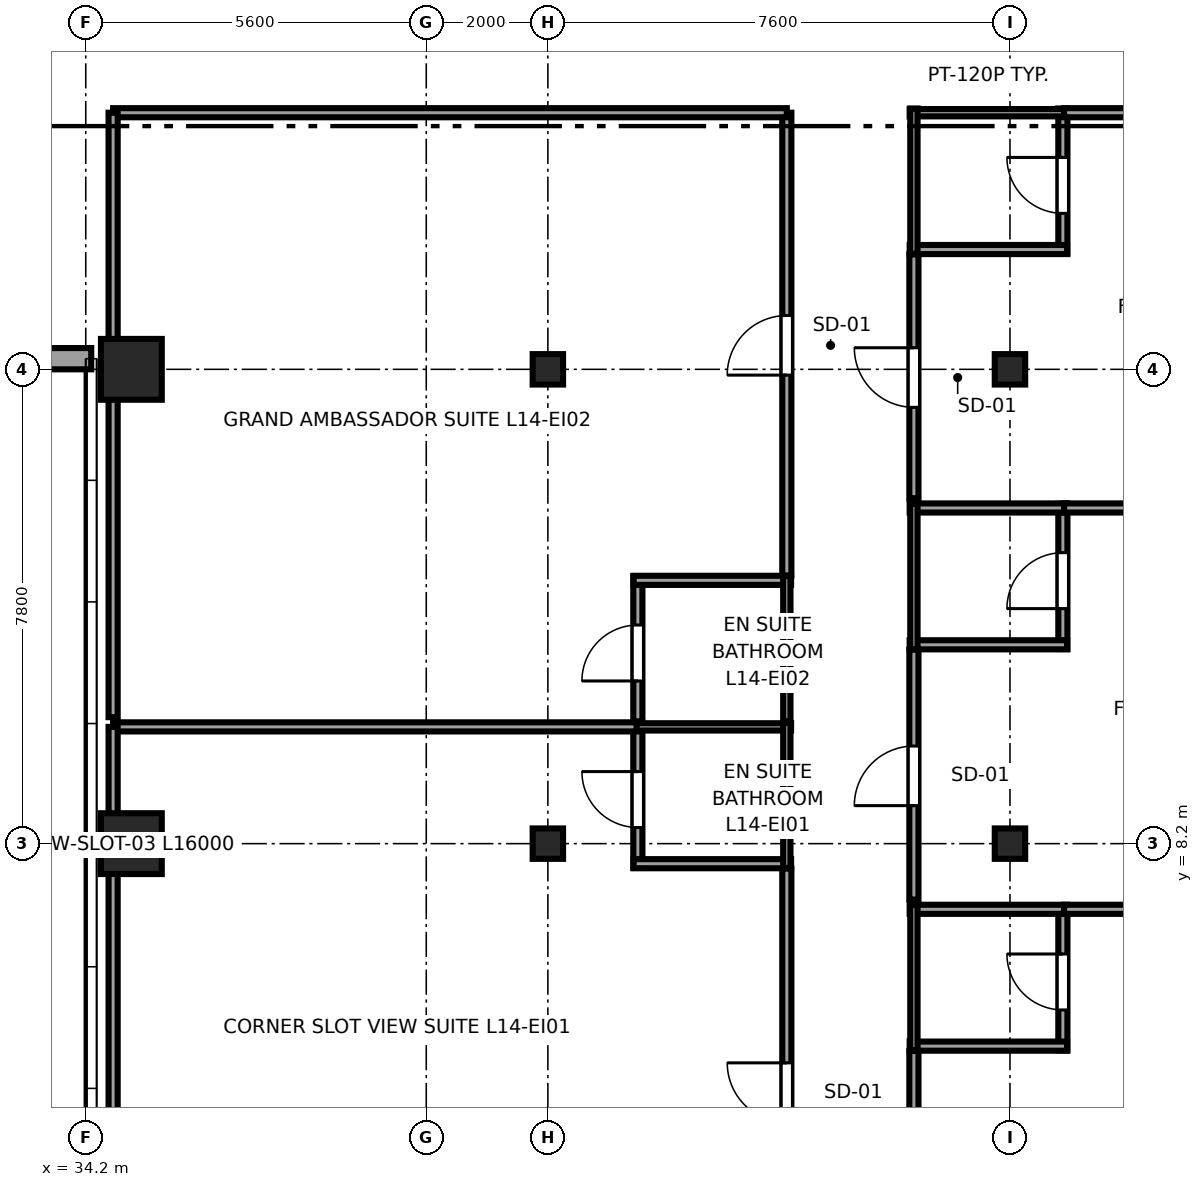
"""IFC4 building model, lengths in metres.
Left out: names, types, materials, properties, quantities, classifications, styles, units other than length and angle.
Written with IfcOpenShell. Run it as: python <this file> out.ifc"""

import sys

from ifc_helpers import new_model, si_unit, direction, frame, frame_2d, origin, origin_2d, place, context, subcontext, project, spatial, rectangle, i_section, extrude, source, transform, mapped, element, fill, save


model = new_model("IFC4")
c1 = context("Model", 3, precision=1e-05, world=origin(), true_north=direction((0.0, 1.0)))
c2 = subcontext(c1, "Body", "Model", "MODEL_VIEW")
j1 = project(units=[si_unit("LENGTHUNIT", "METRE"), si_unit("PLANEANGLEUNIT", "RADIAN")], contexts=[c1])
p1 = place(None, origin())
s1 = spatial("IfcSite", under=j1, at=p1, CompositionType="ELEMENT")
p2 = place(p1, origin())
s2 = spatial("IfcBuilding", under=s1, at=p2, CompositionType="ELEMENT")
p3 = place(p2, frame((0.0, 0.0, 60.4)))
s3 = spatial("IfcBuildingStorey", under=s2, at=p3, CompositionType="ELEMENT", Elevation=60.4)
m1 = source(origin(), c2, "Body", "SweptSolid", [
    extrude(rectangle(XDim=1.0, YDim=1.0, at=origin_2d()), origin(), (0.0, 0.0, 1.0), 3.55),
])
for number, where, z_axis, x_axis in (
    (1, (34.95, 8.2, 0.0), (0.0, 0.0, 1.0), (1.0, 0.0, 0.0)),
    (2, (34.95, 16.0, 0.0), (0.0, 0.0, 1.0), (1.0, 0.0, 0.0)),
):
    element("IfcColumn", number, at=place(p3, frame(where, z_axis=z_axis, x_axis=x_axis)), inside=s3, PredefinedType="COLUMN", context=c2, shape_type="MappedRepresentation", body=[
        mapped(m1, transform((0.0, 0.0, 0.0), x_axis=(1.0, 0.0, 0.0), y_axis=(0.0, 1.0, 0.0), z_axis=(0.0, 0.0, 1.0), scale=1.0)),
    ])
m2 = source(origin(), c2, "Body", "SweptSolid", [
    extrude(i_section(OverallWidth=0.5, OverallDepth=0.5, WebThickness=0.028, FlangeThickness=0.045, at=origin_2d()), origin(), (0.0, 0.0, 1.0), 3.55),
])
for number, where, z_axis, x_axis in (
    (3, (41.8, 8.2, 0.0), (0.0, 0.0, 1.0), (1.0, 0.0, 0.0)),
    (4, (41.8, 16.0, 0.0), (0.0, 0.0, 1.0), (1.0, 0.0, 0.0)),
    (5, (49.4, 8.2, 0.0), (0.0, 0.0, 1.0), (1.0, 0.0, 0.0)),
    (6, (49.4, 16.0, 0.0), (0.0, 0.0, 1.0), (1.0, 0.0, 0.0)),
):
    element("IfcColumn", number, at=place(p3, frame(where, z_axis=z_axis, x_axis=x_axis)), inside=s3, PredefinedType="COLUMN", context=c2, shape_type="MappedRepresentation", body=[
        mapped(m2, transform((0.0, 0.0, 0.0), x_axis=(1.0, 0.0, 0.0), y_axis=(0.0, 1.0, 0.0), z_axis=(0.0, 0.0, 1.0), scale=1.0)),
    ])
p4 = place(p3, frame((22.71, 16.175, 0.0), z_axis=(0.0, 0.0, 1.0), x_axis=(1.0, 0.0, 0.0)))
e7 = element("IfcWall", 7, at=p4, inside=s3, PredefinedType="SOLIDWALL", context=c2, shape_type="SweptSolid", body=[
    extrude(rectangle(XDim=11.58, YDim=0.35, at=frame_2d((5.79, 0.0))), origin(), (0.0, 0.0, 1.0), 2.748),
])
p5 = place(p4, frame((2.295, 0.0, 0.68)))
e8 = element("IfcOpeningElement", 8, at=p5, cuts=e7, PredefinedType="OPENING", context=c2, shape_type="SweptSolid", body=[
    extrude(rectangle(XDim=1.8, YDim=1.85, at=frame_2d((0.9, 0.925))), frame((0.0, 0.185, 0.0), z_axis=(0.0, -1.0, 0.0), x_axis=(1.0, 0.0, 0.0)), (0.0, 0.0, 1.0), 0.37),
])
p6 = place(p4, frame((7.485, 0.0, 0.68)))
e9 = element("IfcOpeningElement", 9, at=p6, cuts=e7, PredefinedType="OPENING", context=c2, shape_type="SweptSolid", body=[
    extrude(rectangle(XDim=1.8, YDim=1.85, at=frame_2d((0.9, 0.925))), frame((0.0, 0.185, 0.0), z_axis=(0.0, -1.0, 0.0), x_axis=(1.0, 0.0, 0.0)), (0.0, 0.0, 1.0), 0.37),
])
p7 = place(p3, frame((43.28, 7.8, 0.0), z_axis=(0.0, 0.0, 1.0), x_axis=(0.0, 1.0, 0.0)))
e10 = element("IfcWall", 10, at=p7, inside=s3, PredefinedType="PARTITIONING", context=c2, shape_type="SweptSolid", body=[
    extrude(rectangle(XDim=2.39, YDim=0.15, at=frame_2d((1.195, 0.0))), origin(), (0.0, 0.0, 1.0), 3.37),
])
p8 = place(p7, frame((0.665, 0.0, 0.0)))
e11 = element("IfcOpeningElement", 11, at=p8, cuts=e10, PredefinedType="OPENING", context=c2, shape_type="SweptSolid", body=[
    extrude(rectangle(XDim=0.92, YDim=2.01, at=frame_2d((0.46, 1.005))), frame((0.0, 0.085, 0.0), z_axis=(0.0, -1.0, 0.0), x_axis=(1.0, 0.0, 0.0)), (0.0, 0.0, 1.0), 0.17),
])
p9 = place(p3, frame((43.21, 7.87, 0.0), z_axis=(0.0, 0.0, 1.0), x_axis=(1.0, 0.0, 0.0)))
e12 = element("IfcWall", 12, at=p9, inside=s3, PredefinedType="PARTITIONING", context=c2, shape_type="SweptSolid", body=[
    extrude(rectangle(XDim=2.59, YDim=0.15, at=frame_2d((1.295, 0.0))), origin(), (0.0, 0.0, 1.0), 3.37),
])
p10 = place(p3, frame((43.21, 10.12, 0.0), z_axis=(0.0, 0.0, 1.0), x_axis=(1.0, 0.0, 0.0)))
e13 = element("IfcWall", 13, at=p10, inside=s3, PredefinedType="PLUMBINGWALL", context=c2, shape_type="SweptSolid", body=[
    extrude(rectangle(XDim=2.59, YDim=0.12, at=frame_2d((1.295, 0.0))), origin(), (0.0, 0.0, 1.0), 3.37),
])
p11 = place(p3, frame((45.73, 7.8, 0.0), z_axis=(0.0, 0.0, 1.0), x_axis=(0.0, 1.0, 0.0)))
e14 = element("IfcWall", 14, at=p11, inside=s3, PredefinedType="PLUMBINGWALL", context=c2, shape_type="SweptSolid", body=[
    extrude(rectangle(XDim=2.39, YDim=0.12, at=frame_2d((1.195, 0.0))), origin(), (0.0, 0.0, 1.0), 2.954),
])
p12 = place(p3, frame((43.28, 10.21, 0.0), z_axis=(0.0, 0.0, 1.0), x_axis=(0.0, 1.0, 0.0)))
e15 = element("IfcWall", 15, at=p12, inside=s3, PredefinedType="PARTITIONING", context=c2, shape_type="SweptSolid", body=[
    extrude(rectangle(XDim=2.39, YDim=0.15, at=frame_2d((1.195, 0.0))), origin(), (0.0, 0.0, 1.0), 3.37),
])
p13 = place(p12, frame((0.665, 0.0, 0.0)))
e16 = element("IfcOpeningElement", 16, at=p13, cuts=e15, PredefinedType="OPENING", context=c2, shape_type="SweptSolid", body=[
    extrude(rectangle(XDim=0.92, YDim=2.01, at=frame_2d((0.46, 1.005))), frame((0.0, 0.085, 0.0), z_axis=(0.0, -1.0, 0.0), x_axis=(1.0, 0.0, 0.0)), (0.0, 0.0, 1.0), 0.17),
])
p14 = place(p3, frame((43.21, 12.53, 0.0), z_axis=(0.0, 0.0, 1.0), x_axis=(1.0, 0.0, 0.0)))
e17 = element("IfcWall", 17, at=p14, inside=s3, PredefinedType="PARTITIONING", context=c2, shape_type="SweptSolid", body=[
    extrude(rectangle(XDim=2.59, YDim=0.15, at=frame_2d((1.295, 0.0))), origin(), (0.0, 0.0, 1.0), 3.37),
])
p15 = place(p3, frame((45.73, 10.21, 0.0), z_axis=(0.0, 0.0, 1.0), x_axis=(0.0, 1.0, 0.0)))
e18 = element("IfcWall", 18, at=p15, inside=s3, PredefinedType="PLUMBINGWALL", context=c2, shape_type="SweptSolid", body=[
    extrude(rectangle(XDim=2.39, YDim=0.12, at=frame_2d((1.195, 0.0))), origin(), (0.0, 0.0, 1.0), 2.954),
])
p16 = place(p3, frame((50.27, 4.8, 0.0), z_axis=(0.0, 0.0, 1.0), x_axis=(0.0, 1.0, 0.0)))
e19 = element("IfcWall", 19, at=p16, inside=s3, PredefinedType="PARTITIONING", context=c2, shape_type="SweptSolid", body=[
    extrude(rectangle(XDim=2.39, YDim=0.15, at=frame_2d((1.195, 0.0))), origin(), (0.0, 0.0, 1.0), 3.37),
])
p17 = place(p16, frame((0.665, 0.0, 0.0)))
e20 = element("IfcOpeningElement", 20, at=p17, cuts=e19, PredefinedType="OPENING", context=c2, shape_type="SweptSolid", body=[
    extrude(rectangle(XDim=0.92, YDim=2.01, at=frame_2d((0.46, 1.005))), frame((0.0, 0.085, 0.0), z_axis=(0.0, -1.0, 0.0), x_axis=(1.0, 0.0, 0.0)), (0.0, 0.0, 1.0), 0.17),
])
for number, where, z_axis, x_axis in (
    (21, (47.75, 4.87, 0.0), (0.0, 0.0, 1.0), (1.0, 0.0, 0.0)),
    (22, (47.75, 7.12, 0.0), (0.0, 0.0, 1.0), (1.0, 0.0, 0.0)),
):
    element("IfcWall", number, at=place(p3, frame(where, z_axis=z_axis, x_axis=x_axis)), inside=s3, PredefinedType="PARTITIONING", context=c2, shape_type="SweptSolid", body=[
        extrude(rectangle(XDim=2.59, YDim=0.15, at=frame_2d((1.295, 0.0))), origin(), (0.0, 0.0, 1.0), 3.37),
    ])
p18 = place(p3, frame((47.82, 4.8, 0.0), z_axis=(0.0, 0.0, 1.0), x_axis=(0.0, 1.0, 0.0)))
e23 = element("IfcWall", 23, at=p18, inside=s3, PredefinedType="PLUMBINGWALL", context=c2, shape_type="SweptSolid", body=[
    extrude(rectangle(XDim=2.39, YDim=0.12, at=frame_2d((1.195, 0.0))), origin(), (0.0, 0.0, 1.0), 3.37),
])
p19 = place(p3, frame((50.27, 11.4, 0.0), z_axis=(0.0, 0.0, 1.0), x_axis=(0.0, 1.0, 0.0)))
e24 = element("IfcWall", 24, at=p19, inside=s3, PredefinedType="PARTITIONING", context=c2, shape_type="SweptSolid", body=[
    extrude(rectangle(XDim=2.39, YDim=0.15, at=frame_2d((1.195, 0.0))), origin(), (0.0, 0.0, 1.0), 3.37),
])
p20 = place(p19, frame((0.665, 0.0, 0.0)))
e25 = element("IfcOpeningElement", 25, at=p20, cuts=e24, PredefinedType="OPENING", context=c2, shape_type="SweptSolid", body=[
    extrude(rectangle(XDim=0.92, YDim=2.01, at=frame_2d((0.46, 1.005))), frame((0.0, 0.085, 0.0), z_axis=(0.0, -1.0, 0.0), x_axis=(1.0, 0.0, 0.0)), (0.0, 0.0, 1.0), 0.17),
])
for number, where, z_axis, x_axis in (
    (26, (47.75, 11.47, 0.0), (0.0, 0.0, 1.0), (1.0, 0.0, 0.0)),
    (27, (47.75, 13.72, 0.0), (0.0, 0.0, 1.0), (1.0, 0.0, 0.0)),
):
    element("IfcWall", number, at=place(p3, frame(where, z_axis=z_axis, x_axis=x_axis)), inside=s3, PredefinedType="PARTITIONING", context=c2, shape_type="SweptSolid", body=[
        extrude(rectangle(XDim=2.59, YDim=0.15, at=frame_2d((1.295, 0.0))), origin(), (0.0, 0.0, 1.0), 3.37),
    ])
p21 = place(p3, frame((47.82, 11.4, 0.0), z_axis=(0.0, 0.0, 1.0), x_axis=(0.0, 1.0, 0.0)))
e28 = element("IfcWall", 28, at=p21, inside=s3, PredefinedType="PLUMBINGWALL", context=c2, shape_type="SweptSolid", body=[
    extrude(rectangle(XDim=2.39, YDim=0.12, at=frame_2d((1.195, 0.0))), origin(), (0.0, 0.0, 1.0), 3.37),
])
p22 = place(p3, frame((50.27, 17.9, 0.0), z_axis=(0.0, 0.0, 1.0), x_axis=(0.0, 1.0, 0.0)))
e29 = element("IfcWall", 29, at=p22, inside=s3, PredefinedType="PARTITIONING", context=c2, shape_type="SweptSolid", body=[
    extrude(rectangle(XDim=2.39, YDim=0.15, at=frame_2d((1.195, 0.0))), origin(), (0.0, 0.0, 1.0), 3.37),
])
p23 = place(p22, frame((0.665, 0.0, 0.0)))
e30 = element("IfcOpeningElement", 30, at=p23, cuts=e29, PredefinedType="OPENING", context=c2, shape_type="SweptSolid", body=[
    extrude(rectangle(XDim=0.92, YDim=2.01, at=frame_2d((0.46, 1.005))), frame((0.0, 0.085, 0.0), z_axis=(0.0, -1.0, 0.0), x_axis=(1.0, 0.0, 0.0)), (0.0, 0.0, 1.0), 0.17),
])
p24 = place(p3, frame((47.75, 17.97, 0.0), z_axis=(0.0, 0.0, 1.0), x_axis=(1.0, 0.0, 0.0)))
e31 = element("IfcWall", 31, at=p24, inside=s3, PredefinedType="PARTITIONING", context=c2, shape_type="SweptSolid", body=[
    extrude(rectangle(XDim=2.59, YDim=0.15, at=frame_2d((1.295, 0.0))), origin(), (0.0, 0.0, 1.0), 3.37),
])
p25 = place(p3, frame((47.75, 20.22, 0.0), z_axis=(0.0, 0.0, 1.0), x_axis=(1.0, 0.0, 0.0)))
e32 = element("IfcWall", 32, at=p25, inside=s3, PredefinedType="PLUMBINGWALL", context=c2, shape_type="SweptSolid", body=[
    extrude(rectangle(XDim=2.59, YDim=0.12, at=frame_2d((1.295, 0.0))), origin(), (0.0, 0.0, 1.0), 3.37),
])
p26 = place(p3, frame((47.82, 17.9, 0.0), z_axis=(0.0, 0.0, 1.0), x_axis=(0.0, 1.0, 0.0)))
e33 = element("IfcWall", 33, at=p26, inside=s3, PredefinedType="PLUMBINGWALL", context=c2, shape_type="SweptSolid", body=[
    extrude(rectangle(XDim=2.39, YDim=0.12, at=frame_2d((1.195, 0.0))), origin(), (0.0, 0.0, 1.0), 3.37),
])
p27 = place(p3, frame((45.73, 0.405, 0.0), z_axis=(0.0, 0.0, 1.0), x_axis=(0.0, 1.0, 0.0)))
e34 = element("IfcWall", 34, at=p27, inside=s3, PredefinedType="PARTITIONING", context=c2, shape_type="SweptSolid", body=[
    extrude(rectangle(XDim=7.385, YDim=0.15, at=frame_2d((3.692, 0.0))), origin(), (0.0, 0.0, 1.0), 3.37),
])
p28 = place(p27, frame((3.21, 0.0, 0.0)))
e35 = element("IfcOpeningElement", 35, at=p28, cuts=e34, PredefinedType="OPENING", context=c2, shape_type="SweptSolid", body=[
    extrude(rectangle(XDim=0.98, YDim=2.12, at=frame_2d((0.49, 1.06))), frame((0.0, 0.085, 0.0), z_axis=(0.0, -1.0, 0.0), x_axis=(1.0, 0.0, 0.0)), (0.0, 0.0, 1.0), 0.17),
])
p29 = place(p3, frame((34.65, 10.12, 0.0), z_axis=(0.0, 0.0, 1.0), x_axis=(1.0, 0.0, 0.0)))
e36 = element("IfcWall", 36, at=p29, inside=s3, PredefinedType="PARTITIONING", context=c2, shape_type="SweptSolid", body=[
    extrude(rectangle(XDim=8.61, YDim=0.15, at=frame_2d((4.305, 0.0))), origin(), (0.0, 0.0, 1.0), 3.37),
])
p30 = place(p3, frame((34.65, 0.405, 0.0), z_axis=(0.0, 0.0, 1.0), x_axis=(0.0, 1.0, 0.0)))
e37 = element("IfcWall", 37, at=p30, inside=s3, PredefinedType="PARTITIONING", context=c2, shape_type="SweptSolid", body=[
    extrude(rectangle(XDim=9.715, YDim=0.15, at=frame_2d((4.857, 0.0))), origin(), (0.0, 0.0, 1.0), 3.37),
])
p31 = place(p3, frame((45.73, 12.61, 0.0), z_axis=(0.0, 0.0, 1.0), x_axis=(0.0, 1.0, 0.0)))
e38 = element("IfcWall", 38, at=p31, inside=s3, PredefinedType="PARTITIONING", context=c2, shape_type="SweptSolid", body=[
    extrude(rectangle(XDim=7.61, YDim=0.15, at=frame_2d((3.805, 0.0))), origin(), (0.0, 0.0, 1.0), 2.954),
])
p32 = place(p31, frame((3.295, 0.0, 0.0)))
e39 = element("IfcOpeningElement", 39, at=p32, cuts=e38, PredefinedType="OPENING", context=c2, shape_type="SweptSolid", body=[
    extrude(rectangle(XDim=0.98, YDim=2.12, at=frame_2d((0.49, 1.06))), frame((0.0, 0.085, 0.0), z_axis=(0.0, -1.0, 0.0), x_axis=(1.0, 0.0, 0.0)), (0.0, 0.0, 1.0), 0.17),
])
p33 = place(p3, frame((34.65, 20.22, 0.0), z_axis=(0.0, 0.0, 1.0), x_axis=(1.0, 0.0, 0.0)))
e40 = element("IfcWall", 40, at=p33, inside=s3, PredefinedType="PARTITIONING", context=c2, shape_type="SweptSolid", body=[
    extrude(rectangle(XDim=11.08, YDim=0.15, at=frame_2d((5.54, 0.0))), origin(), (0.0, 0.0, 1.0), 2.954),
])
p34 = place(p3, frame((34.65, 10.28, 0.0), z_axis=(0.0, 0.0, 1.0), x_axis=(0.0, 1.0, 0.0)))
e41 = element("IfcWall", 41, at=p34, inside=s3, PredefinedType="PARTITIONING", context=c2, shape_type="SweptSolid", body=[
    extrude(rectangle(XDim=9.94, YDim=0.15, at=frame_2d((4.97, 0.0))), origin(), (0.0, 0.0, 1.0), 3.37),
])
p35 = place(p3, frame((47.82, 0.405, 0.0), z_axis=(0.0, 0.0, 1.0), x_axis=(0.0, 1.0, 0.0)))
e42 = element("IfcWall", 42, at=p35, inside=s3, PredefinedType="PARTITIONING", context=c2, shape_type="SweptSolid", body=[
    extrude(rectangle(XDim=4.385, YDim=0.15, at=frame_2d((2.192, 0.0))), origin(), (0.0, 0.0, 1.0), 3.37),
])
p36 = place(p35, frame((1.71, 0.0, 0.0)))
e43 = element("IfcOpeningElement", 43, at=p36, cuts=e42, PredefinedType="OPENING", context=c2, shape_type="SweptSolid", body=[
    extrude(rectangle(XDim=0.98, YDim=2.12, at=frame_2d((0.49, 1.06))), frame((0.0, 0.085, 0.0), z_axis=(0.0, -1.0, 0.0), x_axis=(1.0, 0.0, 0.0)), (0.0, 0.0, 1.0), 0.17),
])
p37 = place(p3, frame((50.29, 7.12, 0.0), z_axis=(0.0, 0.0, 1.0), x_axis=(1.0, 0.0, 0.0)))
e44 = element("IfcWall", 44, at=p37, inside=s3, PredefinedType="PARTITIONING", context=c2, shape_type="SweptSolid", body=[
    extrude(rectangle(XDim=6.305, YDim=0.15, at=frame_2d((3.152, 0.0))), origin(), (0.0, 0.0, 1.0), 3.37),
])
p38 = place(p3, frame((47.82, 7.28, 0.0), z_axis=(0.0, 0.0, 1.0), x_axis=(0.0, 1.0, 0.0)))
e45 = element("IfcWall", 45, at=p38, inside=s3, PredefinedType="PARTITIONING", context=c2, shape_type="SweptSolid", body=[
    extrude(rectangle(XDim=4.11, YDim=0.15, at=frame_2d((2.055, 0.0))), origin(), (0.0, 0.0, 1.0), 3.37),
])
p39 = place(p38, frame((1.545, 0.0, 0.0)))
e46 = element("IfcOpeningElement", 46, at=p39, cuts=e45, PredefinedType="OPENING", context=c2, shape_type="SweptSolid", body=[
    extrude(rectangle(XDim=0.98, YDim=2.12, at=frame_2d((0.49, 1.06))), frame((0.0, 0.085, 0.0), z_axis=(0.0, -1.0, 0.0), x_axis=(1.0, 0.0, 0.0)), (0.0, 0.0, 1.0), 0.17),
])
p40 = place(p3, frame((50.29, 13.72, 0.0), z_axis=(0.0, 0.0, 1.0), x_axis=(1.0, 0.0, 0.0)))
e47 = element("IfcWall", 47, at=p40, inside=s3, PredefinedType="PARTITIONING", context=c2, shape_type="SweptSolid", body=[
    extrude(rectangle(XDim=6.305, YDim=0.15, at=frame_2d((3.152, 0.0))), origin(), (0.0, 0.0, 1.0), 3.37),
])
p41 = place(p3, frame((47.82, 13.88, 0.0), z_axis=(0.0, 0.0, 1.0), x_axis=(0.0, 1.0, 0.0)))
e48 = element("IfcWall", 48, at=p41, inside=s3, PredefinedType="PARTITIONING", context=c2, shape_type="SweptSolid", body=[
    extrude(rectangle(XDim=4.01, YDim=0.15, at=frame_2d((2.005, 0.0))), origin(), (0.0, 0.0, 1.0), 3.37),
])
p42 = place(p41, frame((1.495, 0.0, 0.0)))
e49 = element("IfcOpeningElement", 49, at=p42, cuts=e48, PredefinedType="OPENING", context=c2, shape_type="SweptSolid", body=[
    extrude(rectangle(XDim=0.98, YDim=2.12, at=frame_2d((0.49, 1.06))), frame((0.0, 0.085, 0.0), z_axis=(0.0, -1.0, 0.0), x_axis=(1.0, 0.0, 0.0)), (0.0, 0.0, 1.0), 0.17),
])
p43 = place(p3, frame((50.29, 20.22, 0.0), z_axis=(0.0, 0.0, 1.0), x_axis=(1.0, 0.0, 0.0)))
e50 = element("IfcWall", 50, at=p43, inside=s3, PredefinedType="PARTITIONING", context=c2, shape_type="SweptSolid", body=[
    extrude(rectangle(XDim=6.305, YDim=0.15, at=frame_2d((3.152, 0.0))), origin(), (0.0, 0.0, 1.0), 3.37),
])
m3 = source(origin(), c2, "Body", "SweptSolid", [
    extrude(rectangle(XDim=0.92, YDim=2.01, at=frame_2d((0.46, 1.005))), frame((0.0, 0.025, 0.0), z_axis=(0.0, -1.0, 0.0), x_axis=(1.0, 0.0, 0.0)), (0.0, 0.0, 1.0), 0.05),
])
p44 = place(p8, origin())
e51 = element("IfcDoor", 51, at=p44, inside=s3, OperationType="SINGLE_SWING_RIGHT", PredefinedType="DOOR", context=c2, shape_type="MappedRepresentation", body=[
    mapped(m3, transform((0.0, 0.0, 0.0), x_axis=(1.0, 0.0, 0.0), y_axis=(0.0, 1.0, 0.0), z_axis=(0.0, 0.0, 1.0), scale=1.0)),
])
fill(e11, e51)
p45 = place(p13, origin())
e52 = element("IfcDoor", 52, at=p45, inside=s3, OperationType="SINGLE_SWING_LEFT", PredefinedType="DOOR", context=c2, shape_type="MappedRepresentation", body=[
    mapped(m3, transform((0.0, 0.0, 0.0), x_axis=(1.0, 0.0, 0.0), y_axis=(0.0, 1.0, 0.0), z_axis=(0.0, 0.0, 1.0), scale=1.0)),
])
fill(e16, e52)
p46 = place(p17, origin())
e53 = element("IfcDoor", 53, at=p46, inside=s3, OperationType="SINGLE_SWING_RIGHT", PredefinedType="DOOR", context=c2, shape_type="MappedRepresentation", body=[
    mapped(m3, transform((0.0, 0.0, 0.0), x_axis=(1.0, 0.0, 0.0), y_axis=(0.0, 1.0, 0.0), z_axis=(0.0, 0.0, 1.0), scale=1.0)),
])
fill(e20, e53)
p47 = place(p20, origin())
e54 = element("IfcDoor", 54, at=p47, inside=s3, OperationType="SINGLE_SWING_LEFT", PredefinedType="DOOR", context=c2, shape_type="MappedRepresentation", body=[
    mapped(m3, transform((0.0, 0.0, 0.0), x_axis=(1.0, 0.0, 0.0), y_axis=(0.0, 1.0, 0.0), z_axis=(0.0, 0.0, 1.0), scale=1.0)),
])
fill(e25, e54)
p48 = place(p23, origin())
e55 = element("IfcDoor", 55, at=p48, inside=s3, OperationType="SINGLE_SWING_RIGHT", PredefinedType="DOOR", context=c2, shape_type="MappedRepresentation", body=[
    mapped(m3, transform((0.0, 0.0, 0.0), x_axis=(1.0, 0.0, 0.0), y_axis=(0.0, 1.0, 0.0), z_axis=(0.0, 0.0, 1.0), scale=1.0)),
])
fill(e30, e55)
m4 = source(origin(), c2, "Body", "SweptSolid", [
    extrude(rectangle(XDim=0.98, YDim=2.12, at=frame_2d((0.49, 1.06))), frame((0.0, 0.025, 0.0), z_axis=(0.0, -1.0, 0.0), x_axis=(1.0, 0.0, 0.0)), (0.0, 0.0, 1.0), 0.05),
])
p49 = place(p28, origin())
e56 = element("IfcDoor", 56, at=p49, inside=s3, OperationType="SINGLE_SWING_RIGHT", PredefinedType="DOOR", context=c2, shape_type="MappedRepresentation", body=[
    mapped(m4, transform((0.0, 0.0, 0.0), x_axis=(1.0, 0.0, 0.0), y_axis=(0.0, 1.0, 0.0), z_axis=(0.0, 0.0, 1.0), scale=1.0)),
])
fill(e35, e56)
p50 = place(p32, origin())
e57 = element("IfcDoor", 57, at=p50, inside=s3, OperationType="SINGLE_SWING_LEFT", PredefinedType="DOOR", context=c2, shape_type="MappedRepresentation", body=[
    mapped(m4, transform((0.0, 0.0, 0.0), x_axis=(1.0, 0.0, 0.0), y_axis=(0.0, 1.0, 0.0), z_axis=(0.0, 0.0, 1.0), scale=1.0)),
])
fill(e39, e57)
p51 = place(p39, origin())
e58 = element("IfcDoor", 58, at=p51, inside=s3, OperationType="SINGLE_SWING_LEFT", PredefinedType="DOOR", context=c2, shape_type="MappedRepresentation", body=[
    mapped(m4, transform((0.0, 0.0, 0.0), x_axis=(1.0, 0.0, 0.0), y_axis=(0.0, 1.0, 0.0), z_axis=(0.0, 0.0, 1.0), scale=1.0)),
])
fill(e46, e58)
p52 = place(p42, origin())
e59 = element("IfcDoor", 59, at=p52, inside=s3, OperationType="SINGLE_SWING_RIGHT", PredefinedType="DOOR", context=c2, shape_type="MappedRepresentation", body=[
    mapped(m4, transform((0.0, 0.0, 0.0), x_axis=(1.0, 0.0, 0.0), y_axis=(0.0, 1.0, 0.0), z_axis=(0.0, 0.0, 1.0), scale=1.0)),
])
fill(e49, e59)
save(model, sys.argv[1])
